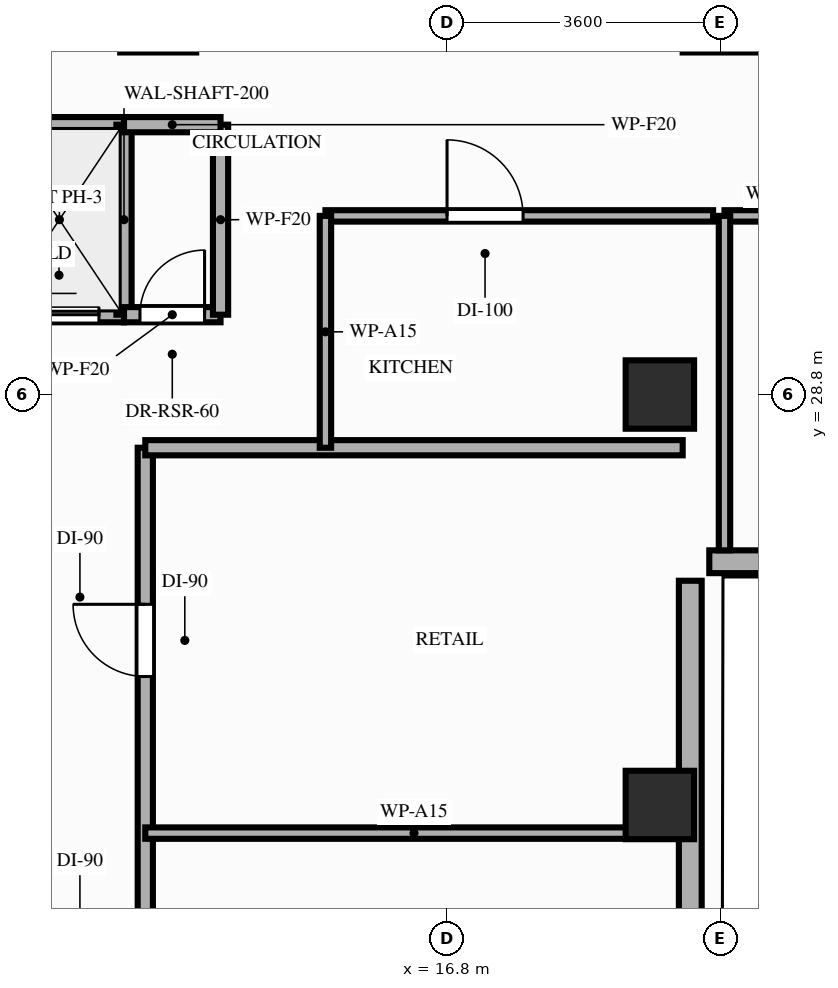
"""IFC4 building model, lengths in metres.
Left out: names, types, materials, properties, quantities, classifications, styles, units other than length and angle.
Written with IfcOpenShell. Run it as: python <this file> out.ifc"""

import sys

from ifc_helpers import new_model, si_unit, direction, frame, frame_2d, origin, origin_2d, place, context, subcontext, project, spatial, rectangle, extrude, element, fill, save


model = new_model("IFC4")
c1 = context("Model", 3, precision=1e-05, world=origin(), true_north=direction((0.0, 1.0)))
c2 = subcontext(c1, "Body", "Model", "MODEL_VIEW")
j1 = project(units=[si_unit("LENGTHUNIT", "METRE"), si_unit("PLANEANGLEUNIT", "RADIAN")], contexts=[c1])
p1 = place(None, origin())
s1 = spatial("IfcSite", under=j1, at=p1, CompositionType="ELEMENT")
p2 = place(p1, origin())
s2 = spatial("IfcBuilding", under=s1, at=p2, CompositionType="ELEMENT")
p3 = place(p2, frame((0.0, 0.0, 160.0)))
s3 = spatial("IfcBuildingStorey", under=s2, at=p3, CompositionType="ELEMENT", Elevation=160.0)
for number, where, z_axis, x_axis in (
    (1, (19.6, 23.4, 0.0), (0.0, 0.0, 1.0), (1.0, 0.0, 0.0)),
    (2, (19.6, 28.8, 0.0), (0.0, 0.0, 1.0), (1.0, 0.0, 0.0)),
):
    element("IfcColumn", number, at=place(p3, frame(where, z_axis=z_axis, x_axis=x_axis)), inside=s3, PredefinedType="COLUMN", context=c2, shape_type="SweptSolid", body=[
        extrude(rectangle(XDim=0.9, YDim=0.9, at=origin_2d()), origin(), (0.0, 0.0, 1.0), 3.2),
    ])
p4 = place(p3, frame((20.0, 8.8, 0.0), z_axis=(0.0, 0.0, 1.0), x_axis=(0.0, 1.0, 0.0)))
e3 = element("IfcWall", 3, at=p4, inside=s3, PredefinedType="STANDARD", context=c2, shape_type="SweptSolid", body=[
    extrude(rectangle(XDim=17.55, YDim=0.3, at=frame_2d((8.775, 0.0))), origin(), (0.0, 0.0, 1.0), 2.46),
])
p5 = place(p4, frame((1.84, 0.0, 0.85)))
e4 = element("IfcOpeningElement", 4, at=p5, cuts=e3, PredefinedType="OPENING", context=c2, shape_type="SweptSolid", body=[
    extrude(rectangle(XDim=1.1, YDim=1.36, at=frame_2d((0.55, 0.68))), frame((0.0, 0.16, 0.0), z_axis=(0.0, -1.0, 0.0), x_axis=(1.0, 0.0, 0.0)), (0.0, 0.0, 1.0), 0.32),
])
p6 = place(p4, frame((5.86, 0.0, 0.85)))
e5 = element("IfcOpeningElement", 5, at=p6, cuts=e3, PredefinedType="OPENING", context=c2, shape_type="SweptSolid", body=[
    extrude(rectangle(XDim=2.1, YDim=1.36, at=frame_2d((1.05, 0.68))), frame((0.0, 0.16, 0.0), z_axis=(0.0, -1.0, 0.0), x_axis=(1.0, 0.0, 0.0)), (0.0, 0.0, 1.0), 0.32),
])
p7 = place(p4, frame((10.85, 0.0, 0.85)))
e6 = element("IfcOpeningElement", 6, at=p7, cuts=e3, PredefinedType="OPENING", context=c2, shape_type="SweptSolid", body=[
    extrude(rectangle(XDim=2.1, YDim=1.36, at=frame_2d((1.05, 0.68))), frame((0.0, 0.16, 0.0), z_axis=(0.0, -1.0, 0.0), x_axis=(1.0, 0.0, 0.0)), (0.0, 0.0, 1.0), 0.32),
])
p8 = place(p3, frame((20.25, 26.6, 0.0), z_axis=(0.0, 0.0, 1.0), x_axis=(1.0, 0.0, 0.0)))
e7 = element("IfcWall", 7, at=p8, inside=s3, PredefinedType="STANDARD", context=c2, shape_type="SweptSolid", body=[
    extrude(rectangle(XDim=10.55, YDim=0.3, at=frame_2d((5.275, 0.0))), origin(), (0.0, 0.0, 1.0), 3.02),
])
p9 = place(p3, frame((7.0, 29.85, 0.0), z_axis=(0.0, 0.0, 1.0), x_axis=(1.0, 0.0, 0.0)))
e8 = element("IfcWall", 8, at=p9, inside=s3, PredefinedType="MOVABLE", context=c2, shape_type="SweptSolid", body=[
    extrude(rectangle(XDim=5.55, YDim=0.2, at=frame_2d((2.775, 0.0))), origin(), (0.0, 0.0, 1.0), 3.02),
])
p10 = place(p9, frame((0.38, 0.0, 0.0)))
e9 = element("IfcOpeningElement", 9, at=p10, cuts=e8, PredefinedType="OPENING", context=c2, shape_type="SweptSolid", body=[
    extrude(rectangle(XDim=1.05, YDim=2.15, at=frame_2d((0.525, 1.075))), frame((0.0, 0.11, 0.0), z_axis=(0.0, -1.0, 0.0), x_axis=(1.0, 0.0, 0.0)), (0.0, 0.0, 1.0), 0.22),
])
p11 = place(p9, frame((2.28, 0.0, 0.0)))
e10 = element("IfcOpeningElement", 10, at=p11, cuts=e8, PredefinedType="OPENING", context=c2, shape_type="SweptSolid", body=[
    extrude(rectangle(XDim=1.05, YDim=2.15, at=frame_2d((0.525, 1.075))), frame((0.0, 0.11, 0.0), z_axis=(0.0, -1.0, 0.0), x_axis=(1.0, 0.0, 0.0)), (0.0, 0.0, 1.0), 0.22),
])
p12 = place(p9, frame((4.17, 0.0, 0.0)))
e11 = element("IfcOpeningElement", 11, at=p12, cuts=e8, PredefinedType="OPENING", context=c2, shape_type="SweptSolid", body=[
    extrude(rectangle(XDim=1.05, YDim=2.15, at=frame_2d((0.525, 1.075))), frame((0.0, 0.11, 0.0), z_axis=(0.0, -1.0, 0.0), x_axis=(1.0, 0.0, 0.0)), (0.0, 0.0, 1.0), 0.22),
])
p13 = place(p3, frame((7.0, 32.35, 0.0), z_axis=(0.0, 0.0, 1.0), x_axis=(1.0, 0.0, 0.0)))
e12 = element("IfcWall", 12, at=p13, inside=s3, PredefinedType="MOVABLE", context=c2, shape_type="SweptSolid", body=[
    extrude(rectangle(XDim=5.55, YDim=0.2, at=frame_2d((2.775, 0.0))), origin(), (0.0, 0.0, 1.0), 3.02),
])
p14 = place(p3, frame((12.55, 29.85, 0.0), z_axis=(0.0, 0.0, 1.0), x_axis=(0.0, 1.0, 0.0)))
e13 = element("IfcWall", 13, at=p14, inside=s3, PredefinedType="MOVABLE", context=c2, shape_type="SweptSolid", body=[
    extrude(rectangle(XDim=2.5, YDim=0.2, at=frame_2d((1.25, 0.0))), origin(), (0.0, 0.0, 1.0), 3.02),
])
p15 = place(p3, frame((12.55, 29.85, 0.0), z_axis=(0.0, 0.0, 1.0), x_axis=(1.0, 0.0, 0.0)))
e14 = element("IfcWall", 14, at=p15, inside=s3, PredefinedType="PARTITIONING", context=c2, shape_type="SweptSolid", body=[
    extrude(rectangle(XDim=1.27, YDim=0.2, at=frame_2d((0.635, 0.0))), origin(), (0.0, 0.0, 1.0), 3.02),
])
p16 = place(p15, frame((0.21, 0.0, 0.0)))
e15 = element("IfcOpeningElement", 15, at=p16, cuts=e14, PredefinedType="OPENING", context=c2, shape_type="SweptSolid", body=[
    extrude(rectangle(XDim=0.85, YDim=2.05, at=frame_2d((0.425, 1.025))), frame((0.0, 0.11, 0.0), z_axis=(0.0, -1.0, 0.0), x_axis=(1.0, 0.0, 0.0)), (0.0, 0.0, 1.0), 0.22),
])
p17 = place(p3, frame((13.82, 29.85, 0.0), z_axis=(0.0, 0.0, 1.0), x_axis=(0.0, 1.0, 0.0)))
e16 = element("IfcWall", 16, at=p17, inside=s3, PredefinedType="PARTITIONING", context=c2, shape_type="SweptSolid", body=[
    extrude(rectangle(XDim=2.5, YDim=0.2, at=frame_2d((1.25, 0.0))), origin(), (0.0, 0.0, 1.0), 3.02),
])
p18 = place(p3, frame((12.55, 32.35, 0.0), z_axis=(0.0, 0.0, 1.0), x_axis=(1.0, 0.0, 0.0)))
e17 = element("IfcWall", 17, at=p18, inside=s3, PredefinedType="PARTITIONING", context=c2, shape_type="SweptSolid", body=[
    extrude(rectangle(XDim=1.27, YDim=0.2, at=frame_2d((0.635, 0.0))), origin(), (0.0, 0.0, 1.0), 3.02),
])
p19 = place(p3, frame((12.83, 12.4, 0.0), z_axis=(0.0, 0.0, 1.0), x_axis=(0.0, 1.0, 0.0)))
e18 = element("IfcWall", 18, at=p19, inside=s3, PredefinedType="PARTITIONING", context=c2, shape_type="SweptSolid", body=[
    extrude(rectangle(XDim=15.7, YDim=0.2, at=frame_2d((7.85, 0.0))), origin(), (0.0, 0.0, 1.0), 2.46),
])
p20 = place(p19, frame((0.42, 0.0, 0.0)))
e19 = element("IfcOpeningElement", 19, at=p20, cuts=e18, PredefinedType="OPENING", context=c2, shape_type="SweptSolid", body=[
    extrude(rectangle(XDim=0.95, YDim=2.1, at=frame_2d((0.475, 1.05))), frame((0.0, 0.11, 0.0), z_axis=(0.0, -1.0, 0.0), x_axis=(1.0, 0.0, 0.0)), (0.0, 0.0, 1.0), 0.22),
])
p21 = place(p19, frame((5.84, 0.0, 0.0)))
e20 = element("IfcOpeningElement", 20, at=p21, cuts=e18, PredefinedType="OPENING", context=c2, shape_type="SweptSolid", body=[
    extrude(rectangle(XDim=0.95, YDim=2.15, at=frame_2d((0.475, 1.075))), frame((0.0, 0.11, 0.0), z_axis=(0.0, -1.0, 0.0), x_axis=(1.0, 0.0, 0.0)), (0.0, 0.0, 1.0), 0.22),
])
p22 = place(p19, frame((12.69, 0.0, 0.0)))
e21 = element("IfcOpeningElement", 21, at=p22, cuts=e18, PredefinedType="OPENING", context=c2, shape_type="SweptSolid", body=[
    extrude(rectangle(XDim=0.95, YDim=2.15, at=frame_2d((0.475, 1.075))), frame((0.0, 0.11, 0.0), z_axis=(0.0, -1.0, 0.0), x_axis=(1.0, 0.0, 0.0)), (0.0, 0.0, 1.0), 0.22),
])
p23 = place(p3, frame((12.83, 28.1, 0.0), z_axis=(0.0, 0.0, 1.0), x_axis=(1.0, 0.0, 0.0)))
e22 = element("IfcWall", 22, at=p23, inside=s3, PredefinedType="PARTITIONING", context=c2, shape_type="SweptSolid", body=[
    extrude(rectangle(XDim=7.07, YDim=0.2, at=frame_2d((3.535, 0.0))), origin(), (0.0, 0.0, 1.0), 2.46),
])
p24 = place(p3, frame((15.2, 31.15, 0.0), z_axis=(0.0, 0.0, 1.0), x_axis=(1.0, 0.0, 0.0)))
e23 = element("IfcWall", 23, at=p24, inside=s3, PredefinedType="PARTITIONING", context=c2, shape_type="SweptSolid", body=[
    extrude(rectangle(XDim=5.1, YDim=0.15, at=frame_2d((2.55, 0.0))), origin(), (0.0, 0.0, 1.0), 2.46),
])
p25 = place(p24, frame((1.6, 0.0, 0.0)))
e24 = element("IfcOpeningElement", 24, at=p25, cuts=e23, PredefinedType="OPENING", context=c2, shape_type="SweptSolid", body=[
    extrude(rectangle(XDim=1.0, YDim=2.15, at=frame_2d((0.5, 1.075))), frame((0.0, 0.085, 0.0), z_axis=(0.0, -1.0, 0.0), x_axis=(1.0, 0.0, 0.0)), (0.0, 0.0, 1.0), 0.17),
])
p26 = place(p3, frame((15.2, 28.1, 0.0), z_axis=(0.0, 0.0, 1.0), x_axis=(0.0, 1.0, 0.0)))
e25 = element("IfcWall", 25, at=p26, inside=s3, PredefinedType="PARTITIONING", context=c2, shape_type="SweptSolid", body=[
    extrude(rectangle(XDim=3.05, YDim=0.15, at=frame_2d((1.525, 0.0))), origin(), (0.0, 0.0, 1.0), 2.46),
])
p27 = place(p3, frame((12.83, 23.03, 0.0), z_axis=(0.0, 0.0, 1.0), x_axis=(1.0, 0.0, 0.0)))
e26 = element("IfcWall", 26, at=p27, inside=s3, PredefinedType="PARTITIONING", context=c2, shape_type="SweptSolid", body=[
    extrude(rectangle(XDim=7.07, YDim=0.15, at=frame_2d((3.535, 0.0))), origin(), (0.0, 0.0, 1.0), 2.46),
])
p28 = place(p3, frame((20.45, 31.15, 0.0), z_axis=(0.0, 0.0, 1.0), x_axis=(1.0, 0.0, 0.0)))
e27 = element("IfcWall", 27, at=p28, inside=s3, PredefinedType="PARTITIONING", context=c2, shape_type="SweptSolid", body=[
    extrude(rectangle(XDim=6.7, YDim=0.15, at=frame_2d((3.35, 0.0))), origin(), (0.0, 0.0, 1.0), 3.02),
])
p29 = place(p28, frame((2.8, 0.0, 0.0)))
e28 = element("IfcOpeningElement", 28, at=p29, cuts=e27, PredefinedType="OPENING", context=c2, shape_type="SweptSolid", body=[
    extrude(rectangle(XDim=1.0, YDim=2.15, at=frame_2d((0.5, 1.075))), frame((0.0, 0.085, 0.0), z_axis=(0.0, -1.0, 0.0), x_axis=(1.0, 0.0, 0.0)), (0.0, 0.0, 1.0), 0.17),
])
p30 = place(p3, frame((20.45, 26.75, 0.0), z_axis=(0.0, 0.0, 1.0), x_axis=(0.0, 1.0, 0.0)))
e29 = element("IfcWall", 29, at=p30, inside=s3, PredefinedType="PARTITIONING", context=c2, shape_type="SweptSolid", body=[
    extrude(rectangle(XDim=4.4, YDim=0.15, at=frame_2d((2.2, 0.0))), origin(), (0.0, 0.0, 1.0), 2.46),
])
p31 = place(p12, origin())
e30 = element("IfcDoor", 30, at=p31, inside=s3, OperationType="SLIDING_TO_LEFT", PredefinedType="DOOR", context=c2, shape_type="SweptSolid", body=[
    extrude(rectangle(XDim=1.05, YDim=2.15, at=frame_2d((0.525, 1.075))), frame((0.0, 0.025, 0.0), z_axis=(0.0, -1.0, 0.0), x_axis=(1.0, 0.0, 0.0)), (0.0, 0.0, 1.0), 0.05),
])
fill(e11, e30)
p32 = place(p16, origin())
e31 = element("IfcDoor", 31, at=p32, inside=s3, OperationType="SINGLE_SWING_RIGHT", PredefinedType="DOOR", context=c2, shape_type="SweptSolid", body=[
    extrude(rectangle(XDim=0.85, YDim=2.05, at=frame_2d((0.425, 1.025))), frame((0.0, 0.025, 0.0), z_axis=(0.0, -1.0, 0.0), x_axis=(1.0, 0.0, 0.0)), (0.0, 0.0, 1.0), 0.05),
])
fill(e15, e31)
p33 = place(p25, origin())
e32 = element("IfcDoor", 32, at=p33, inside=s3, OperationType="SINGLE_SWING_LEFT", PredefinedType="DOOR", context=c2, shape_type="SweptSolid", body=[
    extrude(rectangle(XDim=1.0, YDim=2.15, at=frame_2d((0.5, 1.075))), frame((0.0, 0.025, 0.0), z_axis=(0.0, -1.0, 0.0), x_axis=(1.0, 0.0, 0.0)), (0.0, 0.0, 1.0), 0.05),
])
fill(e24, e32)
p34 = place(p22, origin())
e33 = element("IfcDoor", 33, at=p34, inside=s3, OperationType="SINGLE_SWING_RIGHT", PredefinedType="DOOR", context=c2, shape_type="SweptSolid", body=[
    extrude(rectangle(XDim=0.95, YDim=2.15, at=frame_2d((0.475, 1.075))), frame((0.0, 0.025, 0.0), z_axis=(0.0, -1.0, 0.0), x_axis=(1.0, 0.0, 0.0)), (0.0, 0.0, 1.0), 0.05),
])
fill(e21, e33)
save(model, sys.argv[1])
